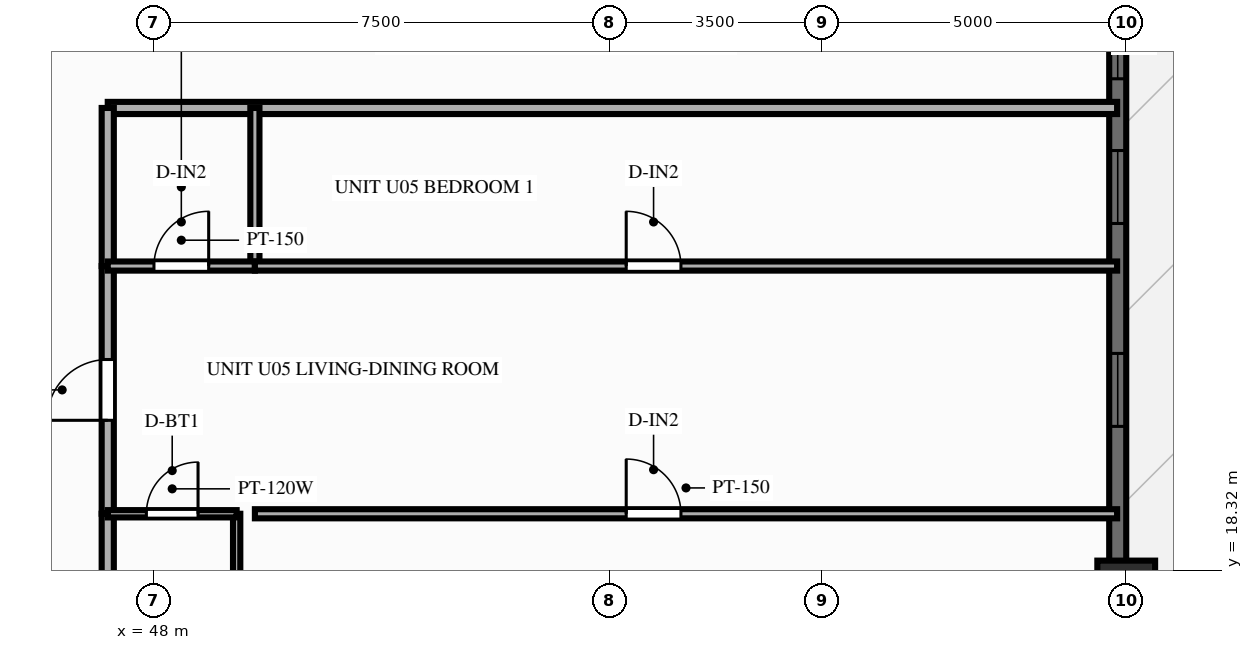
"""IFC4 building model, lengths in metres.
Left out: names, types, materials, properties, quantities, classifications, styles, units other than length and angle.
Written with IfcOpenShell. Run it as: python <this file> out.ifc"""

import sys

from ifc_helpers import new_model, si_unit, direction, frame, frame_2d, origin, origin_2d, place, context, subcontext, project, spatial, rectangle, extrude, source, transform, mapped, element, fill, save


model = new_model("IFC4")
c1 = context("Model", 3, precision=1e-05, world=origin(), true_north=direction((0.0, 1.0)))
c2 = subcontext(c1, "Body", "Model", "MODEL_VIEW")
j1 = project(units=[si_unit("LENGTHUNIT", "METRE"), si_unit("PLANEANGLEUNIT", "RADIAN")], contexts=[c1])
p1 = place(None, origin())
s1 = spatial("IfcSite", under=j1, at=p1, CompositionType="ELEMENT")
p2 = place(p1, origin())
s2 = spatial("IfcBuilding", under=s1, at=p2, CompositionType="ELEMENT")
p3 = place(p2, frame((0.0, 0.0, 95.85)))
s3 = spatial("IfcBuildingStorey", under=s2, at=p3, CompositionType="ELEMENT", Elevation=95.85)
m1 = source(origin(), c2, "Body", "SweptSolid", [
    extrude(rectangle(XDim=0.95, YDim=0.95, at=origin_2d()), origin(), (0.0, 0.0, 1.0), 3.0),
])
p4 = place(p3, frame((64.0, 18.0, 0.0), z_axis=(0.0, 0.0, 1.0), x_axis=(1.0, 0.0, 0.0)))
e1 = element("IfcColumn", 1, at=p4, inside=s3, PredefinedType="COLUMN", context=c2, shape_type="MappedRepresentation", body=[
    mapped(m1, transform((0.0, 0.0, 0.0), scale=1.0)),
])
p5 = place(p3, frame((63.86, 7.2, 0.0), z_axis=(0.0, 0.0, 1.0), x_axis=(0.0, 1.0, 0.0)))
e2 = element("IfcWall", 2, at=p5, inside=s3, PredefinedType="SOLIDWALL", context=c2, shape_type="SweptSolid", body=[
    extrude(rectangle(XDim=39.6, YDim=0.28, at=frame_2d((19.8, 0.0))), origin(), (0.0, 0.0, 1.0), 2.28),
])
p6 = place(p5, frame((0.945, 0.0, 0.25)))
e3 = element("IfcOpeningElement", 3, at=p6, cuts=e2, PredefinedType="OPENING", context=c2, shape_type="SweptSolid", body=[
    extrude(rectangle(XDim=1.2, YDim=1.5, at=frame_2d((0.6, 0.75))), frame((0.0, 0.152, 0.0), z_axis=(0.0, -1.0, 0.0), x_axis=(1.0, 0.0, 0.0)), (0.0, 0.0, 1.0), 0.304),
])
p7 = place(p5, frame((4.213, 0.0, 0.25)))
e4 = element("IfcOpeningElement", 4, at=p7, cuts=e2, PredefinedType="OPENING", context=c2, shape_type="SweptSolid", body=[
    extrude(rectangle(XDim=1.2, YDim=1.5, at=frame_2d((0.6, 0.75))), frame((0.0, 0.152, 0.0), z_axis=(0.0, -1.0, 0.0), x_axis=(1.0, 0.0, 0.0)), (0.0, 0.0, 1.0), 0.304),
])
p8 = place(p5, frame((7.55, 0.0, 0.25)))
e5 = element("IfcOpeningElement", 5, at=p8, cuts=e2, PredefinedType="OPENING", context=c2, shape_type="SweptSolid", body=[
    extrude(rectangle(XDim=1.2, YDim=1.5, at=frame_2d((0.6, 0.75))), frame((0.0, 0.152, 0.0), z_axis=(0.0, -1.0, 0.0), x_axis=(1.0, 0.0, 0.0)), (0.0, 0.0, 1.0), 0.304),
])
p9 = place(p5, frame((13.483, 0.0, 0.25)))
e6 = element("IfcOpeningElement", 6, at=p9, cuts=e2, PredefinedType="OPENING", context=c2, shape_type="SweptSolid", body=[
    extrude(rectangle(XDim=1.2, YDim=1.5, at=frame_2d((0.6, 0.75))), frame((0.0, 0.152, 0.0), z_axis=(0.0, -1.0, 0.0), x_axis=(1.0, 0.0, 0.0)), (0.0, 0.0, 1.0), 0.304),
])
p10 = place(p5, frame((16.82, 0.0, 0.25)))
e7 = element("IfcOpeningElement", 7, at=p10, cuts=e2, PredefinedType="OPENING", context=c2, shape_type="SweptSolid", body=[
    extrude(rectangle(XDim=1.2, YDim=1.5, at=frame_2d((0.6, 0.75))), frame((0.0, 0.152, 0.0), z_axis=(0.0, -1.0, 0.0), x_axis=(1.0, 0.0, 0.0)), (0.0, 0.0, 1.0), 0.304),
])
p11 = place(p5, frame((19.2, 0.0, 0.25)))
e8 = element("IfcOpeningElement", 8, at=p11, cuts=e2, PredefinedType="OPENING", context=c2, shape_type="SweptSolid", body=[
    extrude(rectangle(XDim=1.2, YDim=1.5, at=frame_2d((0.6, 0.75))), frame((0.0, 0.152, 0.0), z_axis=(0.0, -1.0, 0.0), x_axis=(1.0, 0.0, 0.0)), (0.0, 0.0, 1.0), 0.304),
])
p12 = place(p5, frame((21.578, 0.0, 0.25)))
e9 = element("IfcOpeningElement", 9, at=p12, cuts=e2, PredefinedType="OPENING", context=c2, shape_type="SweptSolid", body=[
    extrude(rectangle(XDim=1.2, YDim=1.5, at=frame_2d((0.6, 0.75))), frame((0.0, 0.152, 0.0), z_axis=(0.0, -1.0, 0.0), x_axis=(1.0, 0.0, 0.0)), (0.0, 0.0, 1.0), 0.304),
])
p13 = place(p5, frame((26.313, 0.0, 0.0), z_axis=(0.0, 0.0, 1.0), x_axis=(-1.0, 0.0, 0.0)))
e10 = element("IfcOpeningElement", 10, at=p13, cuts=e2, PredefinedType="OPENING", context=c2, shape_type="SweptSolid", body=[
    extrude(rectangle(XDim=1.6, YDim=2.15, at=frame_2d((0.8, 1.075))), frame((0.0, 0.152, 0.0), z_axis=(0.0, -1.0, 0.0), x_axis=(1.0, 0.0, 0.0)), (0.0, 0.0, 1.0), 0.304),
])
p14 = place(p5, frame((29.305, 0.0, 0.25)))
e11 = element("IfcOpeningElement", 11, at=p14, cuts=e2, PredefinedType="OPENING", context=c2, shape_type="SweptSolid", body=[
    extrude(rectangle(XDim=0.7, YDim=1.5, at=frame_2d((0.35, 0.75))), frame((0.0, 0.152, 0.0), z_axis=(0.0, -1.0, 0.0), x_axis=(1.0, 0.0, 0.0)), (0.0, 0.0, 1.0), 0.304),
])
p15 = place(p5, frame((30.848, 0.0, 0.25)))
e12 = element("IfcOpeningElement", 12, at=p15, cuts=e2, PredefinedType="OPENING", context=c2, shape_type="SweptSolid", body=[
    extrude(rectangle(XDim=1.2, YDim=1.5, at=frame_2d((0.6, 0.75))), frame((0.0, 0.152, 0.0), z_axis=(0.0, -1.0, 0.0), x_axis=(1.0, 0.0, 0.0)), (0.0, 0.0, 1.0), 0.304),
])
p16 = place(p5, frame((34.183, 0.0, 0.25)))
e13 = element("IfcOpeningElement", 13, at=p16, cuts=e2, PredefinedType="OPENING", context=c2, shape_type="SweptSolid", body=[
    extrude(rectangle(XDim=1.2, YDim=1.5, at=frame_2d((0.6, 0.75))), frame((0.0, 0.152, 0.0), z_axis=(0.0, -1.0, 0.0), x_axis=(1.0, 0.0, 0.0)), (0.0, 0.0, 1.0), 0.304),
])
p17 = place(p5, frame((37.452, 0.0, 0.25)))
e14 = element("IfcOpeningElement", 14, at=p17, cuts=e2, PredefinedType="OPENING", context=c2, shape_type="SweptSolid", body=[
    extrude(rectangle(XDim=1.2, YDim=1.5, at=frame_2d((0.6, 0.75))), frame((0.0, 0.152, 0.0), z_axis=(0.0, -1.0, 0.0), x_axis=(1.0, 0.0, 0.0)), (0.0, 0.0, 1.0), 0.304),
])
p18 = place(p3, frame((47.25, 25.92, 0.0), z_axis=(0.0, 0.0, 1.0), x_axis=(1.0, 0.0, 0.0)))
e15 = element("IfcWall", 15, at=p18, inside=s3, PredefinedType="PARTITIONING", context=c2, shape_type="SweptSolid", body=[
    extrude(rectangle(XDim=16.6, YDim=0.2, at=frame_2d((8.3, 0.0))), origin(), (0.0, 0.0, 1.0), 2.79),
])
p19 = place(p3, frame((47.25, 16.65, 0.0), z_axis=(0.0, 0.0, 1.0), x_axis=(0.0, 1.0, 0.0)))
e16 = element("IfcWall", 16, at=p19, inside=s3, PredefinedType="PARTITIONING", context=c2, shape_type="SweptSolid", body=[
    extrude(rectangle(XDim=2.596, YDim=0.2, at=frame_2d((1.298, 0.0))), origin(), (0.0, 0.0, 1.0), 2.79),
])
p20 = place(p3, frame((47.25, 19.246, 0.0), z_axis=(0.0, 0.0, 1.0), x_axis=(0.0, 1.0, 0.0)))
e17 = element("IfcWall", 17, at=p20, inside=s3, PredefinedType="PARTITIONING", context=c2, shape_type="SweptSolid", body=[
    extrude(rectangle(XDim=4.074, YDim=0.2, at=frame_2d((2.037, 0.0))), origin(), (0.0, 0.0, 1.0), 2.79),
])
p21 = place(p20, frame((1.537, 0.0, 0.0)))
e18 = element("IfcOpeningElement", 18, at=p21, cuts=e17, PredefinedType="OPENING", context=c2, shape_type="SweptSolid", body=[
    extrude(rectangle(XDim=1.0, YDim=2.15, at=frame_2d((0.5, 1.075))), frame((0.0, 0.112, 0.0), z_axis=(0.0, -1.0, 0.0), x_axis=(1.0, 0.0, 0.0)), (0.0, 0.0, 1.0), 0.224),
])
p22 = place(p3, frame((47.25, 23.32, 0.0), z_axis=(0.0, 0.0, 1.0), x_axis=(0.0, 1.0, 0.0)))
e19 = element("IfcWall", 19, at=p22, inside=s3, PredefinedType="PARTITIONING", context=c2, shape_type="SweptSolid", body=[
    extrude(rectangle(XDim=2.6, YDim=0.2, at=frame_2d((1.3, 0.0))), origin(), (0.0, 0.0, 1.0), 2.79),
])
p23 = place(p3, frame((49.37, 16.65, 0.0), z_axis=(0.0, 0.0, 1.0), x_axis=(0.0, 1.0, 0.0)))
e20 = element("IfcWall", 20, at=p23, inside=s3, PredefinedType="PARTITIONING", context=c2, shape_type="SweptSolid", body=[
    extrude(rectangle(XDim=2.596, YDim=0.12, at=frame_2d((1.298, 0.0))), origin(), (0.0, 0.0, 1.0), 2.79),
])
p24 = place(p3, frame((49.67, 23.32, 0.0), z_axis=(0.0, 0.0, 1.0), x_axis=(0.0, 1.0, 0.0)))
e21 = element("IfcWall", 21, at=p24, inside=s3, PredefinedType="PARTITIONING", context=c2, shape_type="SweptSolid", body=[
    extrude(rectangle(XDim=2.6, YDim=0.15, at=frame_2d((1.3, 0.0))), origin(), (0.0, 0.0, 1.0), 2.79),
])
p25 = place(p3, frame((47.25, 19.246, 0.0), z_axis=(0.0, 0.0, 1.0), x_axis=(1.0, 0.0, 0.0)))
e22 = element("IfcWall", 22, at=p25, inside=s3, PredefinedType="PARTITIONING", context=c2, shape_type="SweptSolid", body=[
    extrude(rectangle(XDim=2.12, YDim=0.12, at=frame_2d((1.06, 0.0))), origin(), (0.0, 0.0, 1.0), 2.79),
])
p26 = place(p25, frame((0.635, 0.0, 0.0)))
e23 = element("IfcOpeningElement", 23, at=p26, cuts=e22, PredefinedType="OPENING", context=c2, shape_type="SweptSolid", body=[
    extrude(rectangle(XDim=0.85, YDim=2.05, at=frame_2d((0.425, 1.025))), frame((0.0, 0.072, 0.0), z_axis=(0.0, -1.0, 0.0), x_axis=(1.0, 0.0, 0.0)), (0.0, 0.0, 1.0), 0.144),
])
p27 = place(p3, frame((49.67, 19.246, 0.0), z_axis=(0.0, 0.0, 1.0), x_axis=(1.0, 0.0, 0.0)))
e24 = element("IfcWall", 24, at=p27, inside=s3, PredefinedType="PARTITIONING", context=c2, shape_type="SweptSolid", body=[
    extrude(rectangle(XDim=14.18, YDim=0.15, at=frame_2d((7.09, 0.0))), origin(), (0.0, 0.0, 1.0), 2.79),
])
p28 = place(p27, frame((6.107, 0.0, 0.0)))
e25 = element("IfcOpeningElement", 25, at=p28, cuts=e24, PredefinedType="OPENING", context=c2, shape_type="SweptSolid", body=[
    extrude(rectangle(XDim=0.9, YDim=2.1, at=frame_2d((0.45, 1.05))), frame((0.0, 0.087, 0.0), z_axis=(0.0, -1.0, 0.0), x_axis=(1.0, 0.0, 0.0)), (0.0, 0.0, 1.0), 0.174),
])
p29 = place(p3, frame((47.25, 23.32, 0.0), z_axis=(0.0, 0.0, 1.0), x_axis=(1.0, 0.0, 0.0)))
e26 = element("IfcWall", 26, at=p29, inside=s3, PredefinedType="PARTITIONING", context=c2, shape_type="SweptSolid", body=[
    extrude(rectangle(XDim=2.42, YDim=0.15, at=frame_2d((1.21, 0.0))), origin(), (0.0, 0.0, 1.0), 2.79),
])
p30 = place(p29, frame((0.76, 0.0, 0.0)))
e27 = element("IfcOpeningElement", 27, at=p30, cuts=e26, PredefinedType="OPENING", context=c2, shape_type="SweptSolid", body=[
    extrude(rectangle(XDim=0.9, YDim=2.1, at=frame_2d((0.45, 1.05))), frame((0.0, 0.087, 0.0), z_axis=(0.0, -1.0, 0.0), x_axis=(1.0, 0.0, 0.0)), (0.0, 0.0, 1.0), 0.174),
])
p31 = place(p3, frame((49.67, 23.32, 0.0), z_axis=(0.0, 0.0, 1.0), x_axis=(1.0, 0.0, 0.0)))
e28 = element("IfcWall", 28, at=p31, inside=s3, PredefinedType="PARTITIONING", context=c2, shape_type="SweptSolid", body=[
    extrude(rectangle(XDim=14.18, YDim=0.15, at=frame_2d((7.09, 0.0))), origin(), (0.0, 0.0, 1.0), 2.79),
])
p32 = place(p31, frame((6.107, 0.0, 0.0)))
e29 = element("IfcOpeningElement", 29, at=p32, cuts=e28, PredefinedType="OPENING", context=c2, shape_type="SweptSolid", body=[
    extrude(rectangle(XDim=0.9, YDim=2.1, at=frame_2d((0.45, 1.05))), frame((0.0, 0.087, 0.0), z_axis=(0.0, -1.0, 0.0), x_axis=(1.0, 0.0, 0.0)), (0.0, 0.0, 1.0), 0.174),
])
m2 = source(origin(), c2, "Body", "SweptSolid", [
    extrude(rectangle(XDim=1.2, YDim=1.5, at=frame_2d((0.6, 0.75))), frame((0.0, 0.03, 0.0), z_axis=(0.0, -1.0, 0.0), x_axis=(1.0, 0.0, 0.0)), (0.0, 0.0, 1.0), 0.06),
])
p33 = place(p9, origin())
e30 = element("IfcWindow", 30, at=p33, inside=s3, PartitioningType="SINGLE_PANEL", PredefinedType="WINDOW", context=c2, shape_type="MappedRepresentation", body=[
    mapped(m2, transform((0.0, 0.0, 0.0), scale=1.0)),
])
fill(e6, e30)
p34 = place(p10, origin())
e31 = element("IfcWindow", 31, at=p34, inside=s3, PartitioningType="SINGLE_PANEL", PredefinedType="WINDOW", context=c2, shape_type="MappedRepresentation", body=[
    mapped(m2, transform((0.0, 0.0, 0.0), scale=1.0)),
])
fill(e7, e31)
p35 = place(p11, origin())
e32 = element("IfcWindow", 32, at=p35, inside=s3, PartitioningType="SINGLE_PANEL", PredefinedType="WINDOW", context=c2, shape_type="MappedRepresentation", body=[
    mapped(m2, transform((0.0, 0.0, 0.0), scale=1.0)),
])
fill(e8, e32)
m3 = source(origin(), c2, "Body", "SweptSolid", [
    extrude(rectangle(XDim=1.0, YDim=2.15, at=frame_2d((0.5, 1.075))), frame((0.0, 0.025, 0.0), z_axis=(0.0, -1.0, 0.0), x_axis=(1.0, 0.0, 0.0)), (0.0, 0.0, 1.0), 0.05),
])
p36 = place(p21, origin())
e33 = element("IfcDoor", 33, at=p36, inside=s3, OperationType="SINGLE_SWING_LEFT", PredefinedType="DOOR", context=c2, shape_type="MappedRepresentation", body=[
    mapped(m3, transform((0.0, 0.0, 0.0), scale=1.0)),
])
fill(e18, e33)
m4 = source(origin(), c2, "Body", "SweptSolid", [
    extrude(rectangle(XDim=0.85, YDim=2.05, at=frame_2d((0.425, 1.025))), frame((0.0, 0.025, 0.0), z_axis=(0.0, -1.0, 0.0), x_axis=(1.0, 0.0, 0.0)), (0.0, 0.0, 1.0), 0.05),
])
p37 = place(p26, origin())
e34 = element("IfcDoor", 34, at=p37, inside=s3, OperationType="SINGLE_SWING_RIGHT", PredefinedType="DOOR", context=c2, shape_type="MappedRepresentation", body=[
    mapped(m4, transform((0.0, 0.0, 0.0), scale=1.0)),
])
fill(e23, e34)
m5 = source(origin(), c2, "Body", "SweptSolid", [
    extrude(rectangle(XDim=0.9, YDim=2.1, at=frame_2d((0.45, 1.05))), frame((0.0, 0.025, 0.0), z_axis=(0.0, -1.0, 0.0), x_axis=(1.0, 0.0, 0.0)), (0.0, 0.0, 1.0), 0.05),
])
p38 = place(p28, origin())
e35 = element("IfcDoor", 35, at=p38, inside=s3, OperationType="SINGLE_SWING_LEFT", PredefinedType="DOOR", context=c2, shape_type="MappedRepresentation", body=[
    mapped(m5, transform((0.0, 0.0, 0.0), scale=1.0)),
])
fill(e25, e35)
p39 = place(p30, origin())
e36 = element("IfcDoor", 36, at=p39, inside=s3, OperationType="SINGLE_SWING_RIGHT", PredefinedType="DOOR", context=c2, shape_type="MappedRepresentation", body=[
    mapped(m5, transform((0.0, 0.0, 0.0), scale=1.0)),
])
fill(e27, e36)
p40 = place(p32, origin())
e37 = element("IfcDoor", 37, at=p40, inside=s3, OperationType="SINGLE_SWING_LEFT", PredefinedType="DOOR", context=c2, shape_type="MappedRepresentation", body=[
    mapped(m5, transform((0.0, 0.0, 0.0), scale=1.0)),
])
fill(e29, e37)
save(model, sys.argv[1])
